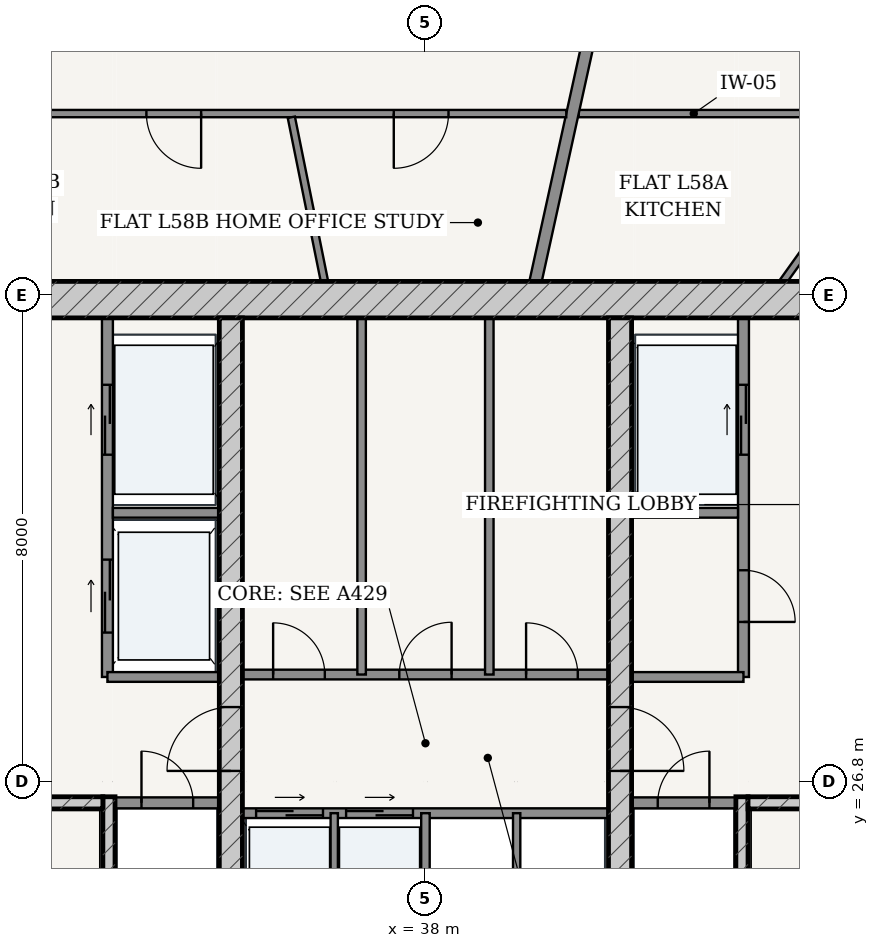
"""IFC4 building model, lengths in metres.
Left out: names, types, materials, properties, quantities, classifications, styles, units other than length and angle.
Written with IfcOpenShell. Run it as: python <this file> out.ifc"""

import sys

from ifc_helpers import new_model, si_unit, direction, frame, frame_2d, origin, place, context, subcontext, project, spatial, rectangle, extrude, source, transform, mapped, element, fill, save


model = new_model("IFC4")
c1 = context("Model", 3, precision=1e-05, world=origin(), true_north=direction((-0.2419218956, 0.970295726276)))
c2 = subcontext(c1, "Body", "Model", "MODEL_VIEW")
j1 = project(units=[si_unit("LENGTHUNIT", "METRE"), si_unit("PLANEANGLEUNIT", "RADIAN")], contexts=[c1])
p1 = place(None, origin())
s1 = spatial("IfcSite", under=j1, at=p1, CompositionType="ELEMENT")
p2 = place(p1, origin())
s2 = spatial("IfcBuilding", under=s1, at=p2, CompositionType="ELEMENT")
p3 = place(p2, frame((0.0, 0.0, 220.8)))
s3 = spatial("IfcBuildingStorey", under=s2, at=p3, CompositionType="ELEMENT", Elevation=220.8)
p4 = place(p3, frame((28.775, 34.725, 0.0), z_axis=(0.0, 0.0, 1.0), x_axis=(1.0, 0.0, 0.0)))
e1 = element("IfcWall", 1, at=p4, inside=s3, PredefinedType="SHEAR", context=c2, shape_type="SweptSolid", body=[
    extrude(rectangle(XDim=18.45, YDim=0.6, at=frame_2d((9.225, 0.0))), origin(), (0.0, 0.0, 1.0), 3.435),
])
p5 = place(p3, frame((32.795, 19.175, 0.0), z_axis=(0.0, 0.0, 1.0), x_axis=(0.0, 1.0, 0.0)))
e2 = element("IfcWall", 2, at=p5, inside=s3, PredefinedType="SOLIDWALL", context=c2, shape_type="SweptSolid", body=[
    extrude(rectangle(XDim=7.375, YDim=0.2, at=frame_2d((3.688, 0.0))), origin(), (0.0, 0.0, 1.0), 3.435),
])
p6 = place(p3, frame((29.375, 26.45, 0.0), z_axis=(0.0, 0.0, 1.0), x_axis=(1.0, 0.0, 0.0)))
e3 = element("IfcWall", 3, at=p6, inside=s3, PredefinedType="SOLIDWALL", context=c2, shape_type="SweptSolid", body=[
    extrude(rectangle(XDim=3.32, YDim=0.2, at=frame_2d((1.66, 0.0))), origin(), (0.0, 0.0, 1.0), 3.435),
])
p7 = place(p6, frame((1.185, 0.0, 0.0)))
e4 = element("IfcOpeningElement", 4, at=p7, cuts=e3, PredefinedType="OPENING", context=c2, shape_type="SweptSolid", body=[
    extrude(rectangle(XDim=0.95, YDim=2.15, at=frame_2d((0.475, 1.075))), frame((0.0, 0.11, 0.0), z_axis=(0.0, -1.0, 0.0), x_axis=(1.0, 0.0, 0.0)), (0.0, 0.0, 1.0), 0.22),
])
p8 = place(p3, frame((43.205, 19.175, 0.0), z_axis=(0.0, 0.0, 1.0), x_axis=(0.0, 1.0, 0.0)))
e5 = element("IfcWall", 5, at=p8, inside=s3, PredefinedType="SOLIDWALL", context=c2, shape_type="SweptSolid", body=[
    extrude(rectangle(XDim=7.375, YDim=0.2, at=frame_2d((3.688, 0.0))), origin(), (0.0, 0.0, 1.0), 3.435),
])
p9 = place(p3, frame((43.305, 26.45, 0.0), z_axis=(0.0, 0.0, 1.0), x_axis=(1.0, 0.0, 0.0)))
e6 = element("IfcWall", 6, at=p9, inside=s3, PredefinedType="SOLIDWALL", context=c2, shape_type="SweptSolid", body=[
    extrude(rectangle(XDim=3.32, YDim=0.2, at=frame_2d((1.66, 0.0))), origin(), (0.0, 0.0, 1.0), 3.435),
])
p10 = place(p9, frame((1.185, 0.0, 0.0)))
e7 = element("IfcOpeningElement", 7, at=p10, cuts=e6, PredefinedType="OPENING", context=c2, shape_type="SweptSolid", body=[
    extrude(rectangle(XDim=0.95, YDim=2.15, at=frame_2d((0.475, 1.075))), frame((0.0, 0.11, 0.0), z_axis=(0.0, -1.0, 0.0), x_axis=(1.0, 0.0, 0.0)), (0.0, 0.0, 1.0), 0.22),
])
p11 = place(p3, frame((34.8, 19.175, 0.0), z_axis=(0.0, 0.0, 1.0), x_axis=(0.0, 1.0, 0.0)))
e8 = element("IfcWall", 8, at=p11, inside=s3, PredefinedType="SHEAR", context=c2, shape_type="SweptSolid", body=[
    extrude(rectangle(XDim=15.25, YDim=0.38, at=frame_2d((7.625, 0.0))), origin(), (0.0, 0.0, 1.0), 3.435),
])
p12 = place(p11, frame((7.8, 0.0, 0.0)))
e9 = element("IfcOpeningElement", 9, at=p12, cuts=e8, PredefinedType="OPENING", context=c2, shape_type="SweptSolid", body=[
    extrude(rectangle(XDim=1.05, YDim=2.15, at=frame_2d((0.525, 1.075))), frame((0.0, 0.2, 0.0), z_axis=(0.0, -1.0, 0.0), x_axis=(1.0, 0.0, 0.0)), (0.0, 0.0, 1.0), 0.4),
])
p13 = place(p3, frame((41.2, 19.175, 0.0), z_axis=(0.0, 0.0, 1.0), x_axis=(0.0, 1.0, 0.0)))
e10 = element("IfcWall", 10, at=p13, inside=s3, PredefinedType="SHEAR", context=c2, shape_type="SweptSolid", body=[
    extrude(rectangle(XDim=15.25, YDim=0.38, at=frame_2d((7.625, 0.0))), origin(), (0.0, 0.0, 1.0), 3.435),
])
p14 = place(p13, frame((7.8, 0.0, 0.0)))
e11 = element("IfcOpeningElement", 11, at=p14, cuts=e10, PredefinedType="OPENING", context=c2, shape_type="SweptSolid", body=[
    extrude(rectangle(XDim=1.05, YDim=2.15, at=frame_2d((0.525, 1.075))), frame((0.0, 0.2, 0.0), z_axis=(0.0, -1.0, 0.0), x_axis=(1.0, 0.0, 0.0)), (0.0, 0.0, 1.0), 0.4),
])
p15 = place(p3, frame((32.9, 26.45, 0.0), z_axis=(0.0, 0.0, 1.0), x_axis=(1.0, 0.0, 0.0)))
e12 = element("IfcWall", 12, at=p15, inside=s3, PredefinedType="PARTITIONING", context=c2, shape_type="SweptSolid", body=[
    extrude(rectangle(XDim=1.71, YDim=0.18, at=frame_2d((0.855, 0.0))), origin(), (0.0, 0.0, 1.0), 3.435),
])
p16 = place(p15, frame((0.43, 0.0, 0.0)))
e13 = element("IfcOpeningElement", 13, at=p16, cuts=e12, PredefinedType="OPENING", context=c2, shape_type="SweptSolid", body=[
    extrude(rectangle(XDim=0.85, YDim=2.1, at=frame_2d((0.425, 1.05))), frame((0.0, 0.1, 0.0), z_axis=(0.0, -1.0, 0.0), x_axis=(1.0, 0.0, 0.0)), (0.0, 0.0, 1.0), 0.2),
])
p17 = place(p3, frame((41.39, 26.45, 0.0), z_axis=(0.0, 0.0, 1.0), x_axis=(1.0, 0.0, 0.0)))
e14 = element("IfcWall", 14, at=p17, inside=s3, PredefinedType="PARTITIONING", context=c2, shape_type="SweptSolid", body=[
    extrude(rectangle(XDim=1.71, YDim=0.18, at=frame_2d((0.855, 0.0))), origin(), (0.0, 0.0, 1.0), 3.435),
])
p18 = place(p17, frame((0.43, 0.0, 0.0)))
e15 = element("IfcOpeningElement", 15, at=p18, cuts=e14, PredefinedType="OPENING", context=c2, shape_type="SweptSolid", body=[
    extrude(rectangle(XDim=0.85, YDim=2.1, at=frame_2d((0.425, 1.05))), frame((0.0, 0.1, 0.0), z_axis=(0.0, -1.0, 0.0), x_axis=(1.0, 0.0, 0.0)), (0.0, 0.0, 1.0), 0.2),
])
p19 = place(p3, frame((32.77, 28.52, 0.0), z_axis=(0.0, 0.0, 1.0), x_axis=(0.0, 1.0, 0.0)))
e16 = element("IfcWall", 16, at=p19, inside=s3, PredefinedType="PARTITIONING", context=c2, shape_type="SweptSolid", body=[
    extrude(rectangle(XDim=5.905, YDim=0.18, at=frame_2d((2.953, 0.0))), origin(), (0.0, 0.0, 1.0), 3.435),
])
p20 = place(p19, frame((3.655, 0.0, 0.0)))
e17 = element("IfcOpeningElement", 17, at=p20, cuts=e16, PredefinedType="OPENING", context=c2, shape_type="SweptSolid", body=[
    extrude(rectangle(XDim=1.15, YDim=2.2, at=frame_2d((0.575, 1.1))), frame((0.0, 0.1, 0.0), z_axis=(0.0, -1.0, 0.0), x_axis=(1.0, 0.0, 0.0)), (0.0, 0.0, 1.0), 0.2),
])
p21 = place(p19, frame((0.73, 0.0, 0.0)))
e18 = element("IfcOpeningElement", 18, at=p21, cuts=e16, PredefinedType="OPENING", context=c2, shape_type="SweptSolid", body=[
    extrude(rectangle(XDim=1.2, YDim=2.25, at=frame_2d((0.6, 1.125))), frame((0.0, 0.1, 0.0), z_axis=(0.0, -1.0, 0.0), x_axis=(1.0, 0.0, 0.0)), (0.0, 0.0, 1.0), 0.2),
])
p22 = place(p3, frame((32.86, 31.22, 0.0), z_axis=(0.0, 0.0, 1.0), x_axis=(1.0, 0.0, 0.0)))
e19 = element("IfcWall", 19, at=p22, inside=s3, PredefinedType="PARTITIONING", context=c2, shape_type="SweptSolid", body=[
    extrude(rectangle(XDim=1.75, YDim=0.16, at=frame_2d((0.875, 0.0))), origin(), (0.0, 0.0, 1.0), 3.435),
])
p23 = place(p3, frame((32.77, 28.52, 0.0), z_axis=(0.0, 0.0, 1.0), x_axis=(1.0, 0.0, 0.0)))
e20 = element("IfcWall", 20, at=p23, inside=s3, PredefinedType="PARTITIONING", context=c2, shape_type="SweptSolid", body=[
    extrude(rectangle(XDim=1.84, YDim=0.16, at=frame_2d((0.92, 0.0))), origin(), (0.0, 0.0, 1.0), 3.435),
])
p24 = place(p3, frame((43.23, 28.52, 0.0), z_axis=(0.0, 0.0, 1.0), x_axis=(0.0, 1.0, 0.0)))
e21 = element("IfcWall", 21, at=p24, inside=s3, PredefinedType="PARTITIONING", context=c2, shape_type="SweptSolid", body=[
    extrude(rectangle(XDim=5.905, YDim=0.18, at=frame_2d((2.953, 0.0))), origin(), (0.0, 0.0, 1.0), 3.435),
])
p25 = place(p24, frame((0.905, 0.0, 0.0)))
e22 = element("IfcOpeningElement", 22, at=p25, cuts=e21, PredefinedType="OPENING", context=c2, shape_type="SweptSolid", body=[
    extrude(rectangle(XDim=0.85, YDim=2.1, at=frame_2d((0.425, 1.05))), frame((0.0, 0.1, 0.0), z_axis=(0.0, -1.0, 0.0), x_axis=(1.0, 0.0, 0.0)), (0.0, 0.0, 1.0), 0.2),
])
p26 = place(p24, frame((3.655, 0.0, 0.0)))
e23 = element("IfcOpeningElement", 23, at=p26, cuts=e21, PredefinedType="OPENING", context=c2, shape_type="SweptSolid", body=[
    extrude(rectangle(XDim=1.15, YDim=2.2, at=frame_2d((0.575, 1.1))), frame((0.0, 0.1, 0.0), z_axis=(0.0, -1.0, 0.0), x_axis=(1.0, 0.0, 0.0)), (0.0, 0.0, 1.0), 0.2),
])
p27 = place(p3, frame((41.39, 31.22, 0.0), z_axis=(0.0, 0.0, 1.0), x_axis=(1.0, 0.0, 0.0)))
e24 = element("IfcWall", 24, at=p27, inside=s3, PredefinedType="PARTITIONING", context=c2, shape_type="SweptSolid", body=[
    extrude(rectangle(XDim=1.75, YDim=0.16, at=frame_2d((0.875, 0.0))), origin(), (0.0, 0.0, 1.0), 3.435),
])
p28 = place(p3, frame((41.39, 28.52, 0.0), z_axis=(0.0, 0.0, 1.0), x_axis=(1.0, 0.0, 0.0)))
e25 = element("IfcWall", 25, at=p28, inside=s3, PredefinedType="PARTITIONING", context=c2, shape_type="SweptSolid", body=[
    extrude(rectangle(XDim=1.84, YDim=0.16, at=frame_2d((0.92, 0.0))), origin(), (0.0, 0.0, 1.0), 3.435),
])
p29 = place(p3, frame((34.99, 28.56, 0.0), z_axis=(0.0, 0.0, 1.0), x_axis=(1.0, 0.0, 0.0)))
e26 = element("IfcWall", 26, at=p29, inside=s3, PredefinedType="PARTITIONING", context=c2, shape_type="SweptSolid", body=[
    extrude(rectangle(XDim=6.02, YDim=0.16, at=frame_2d((3.01, 0.0))), origin(), (0.0, 0.0, 1.0), 3.435),
])
p30 = place(p29, frame((0.505, 0.0, 0.0)))
e27 = element("IfcOpeningElement", 27, at=p30, cuts=e26, PredefinedType="OPENING", context=c2, shape_type="SweptSolid", body=[
    extrude(rectangle(XDim=0.85, YDim=2.1, at=frame_2d((0.425, 1.05))), frame((0.0, 0.09, 0.0), z_axis=(0.0, -1.0, 0.0), x_axis=(1.0, 0.0, 0.0)), (0.0, 0.0, 1.0), 0.18),
])
p31 = place(p29, frame((2.58, 0.0, 0.0)))
e28 = element("IfcOpeningElement", 28, at=p31, cuts=e26, PredefinedType="OPENING", context=c2, shape_type="SweptSolid", body=[
    extrude(rectangle(XDim=0.86, YDim=2.1, at=frame_2d((0.43, 1.05))), frame((0.0, 0.09, 0.0), z_axis=(0.0, -1.0, 0.0), x_axis=(1.0, 0.0, 0.0)), (0.0, 0.0, 1.0), 0.18),
])
p32 = place(p29, frame((4.665, 0.0, 0.0)))
e29 = element("IfcOpeningElement", 29, at=p32, cuts=e26, PredefinedType="OPENING", context=c2, shape_type="SweptSolid", body=[
    extrude(rectangle(XDim=0.85, YDim=2.1, at=frame_2d((0.425, 1.05))), frame((0.0, 0.09, 0.0), z_axis=(0.0, -1.0, 0.0), x_axis=(1.0, 0.0, 0.0)), (0.0, 0.0, 1.0), 0.18),
])
for number, where, z_axis, x_axis in (
    (30, (36.95, 28.56, 0.0), (0.0, 0.0, 1.0), (0.0, 1.0, 0.0)),
    (31, (39.05, 28.56, 0.0), (0.0, 0.0, 1.0), (0.0, 1.0, 0.0)),
):
    element("IfcWall", number, at=place(p3, frame(where, z_axis=z_axis, x_axis=x_axis)), inside=s3, PredefinedType="PARTITIONING", context=c2, shape_type="SweptSolid", body=[
        extrude(rectangle(XDim=5.865, YDim=0.14, at=frame_2d((2.933, 0.0))), origin(), (0.0, 0.0, 1.0), 3.435),
    ])
p33 = place(p3, frame((34.99, 26.28, 0.0), z_axis=(0.0, 0.0, 1.0), x_axis=(1.0, 0.0, 0.0)))
e32 = element("IfcWall", 32, at=p33, inside=s3, PredefinedType="PARTITIONING", context=c2, shape_type="SweptSolid", body=[
    extrude(rectangle(XDim=6.02, YDim=0.16, at=frame_2d((3.01, 0.0))), origin(), (0.0, 0.0, 1.0), 3.435),
])
p34 = place(p33, frame((0.225, 0.0, 0.0)))
e33 = element("IfcOpeningElement", 33, at=p34, cuts=e32, PredefinedType="OPENING", context=c2, shape_type="SweptSolid", body=[
    extrude(rectangle(XDim=1.1, YDim=2.2, at=frame_2d((0.55, 1.1))), frame((0.0, 0.09, 0.0), z_axis=(0.0, -1.0, 0.0), x_axis=(1.0, 0.0, 0.0)), (0.0, 0.0, 1.0), 0.18),
])
p35 = place(p33, frame((1.705, 0.0, 0.0)))
e34 = element("IfcOpeningElement", 34, at=p35, cuts=e32, PredefinedType="OPENING", context=c2, shape_type="SweptSolid", body=[
    extrude(rectangle(XDim=1.1, YDim=2.2, at=frame_2d((0.55, 1.1))), frame((0.0, 0.09, 0.0), z_axis=(0.0, -1.0, 0.0), x_axis=(1.0, 0.0, 0.0)), (0.0, 0.0, 1.0), 0.18),
])
p36 = place(p3, frame((36.5, 23.72, 0.0), z_axis=(0.0, 0.0, 1.0), x_axis=(0.0, 1.0, 0.0)))
e35 = element("IfcWall", 35, at=p36, inside=s3, PredefinedType="PARTITIONING", context=c2, shape_type="SweptSolid", body=[
    extrude(rectangle(XDim=2.56, YDim=0.12, at=frame_2d((1.28, 0.0))), origin(), (0.0, 0.0, 1.0), 3.435),
])
p37 = place(p3, frame((38.0, 23.72, 0.0), z_axis=(0.0, 0.0, 1.0), x_axis=(0.0, 1.0, 0.0)))
e36 = element("IfcWall", 36, at=p37, inside=s3, PredefinedType="PARTITIONING", context=c2, shape_type="SweptSolid", body=[
    extrude(rectangle(XDim=2.56, YDim=0.14, at=frame_2d((1.28, 0.0))), origin(), (0.0, 0.0, 1.0), 3.435),
])
p38 = place(p3, frame((39.5, 23.72, 0.0), z_axis=(0.0, 0.0, 1.0), x_axis=(0.0, 1.0, 0.0)))
e37 = element("IfcWall", 37, at=p38, inside=s3, PredefinedType="PARTITIONING", context=c2, shape_type="SweptSolid", body=[
    extrude(rectangle(XDim=2.56, YDim=0.12, at=frame_2d((1.28, 0.0))), origin(), (0.0, 0.0, 1.0), 3.435),
])
p39 = place(p3, frame((40.52, 37.785, 0.0), z_axis=(0.0, 0.0, 1.0), x_axis=(1.0, 0.0, 0.0)))
e38 = element("IfcWall", 38, at=p39, inside=s3, PredefinedType="PARTITIONING", context=c2, shape_type="SweptSolid", body=[
    extrude(rectangle(XDim=3.785, YDim=0.12, at=frame_2d((1.893, 0.0))), origin(), (0.0, 0.0, 1.0), 2.951),
])
p40 = place(p3, frame((43.885, 35.027, 0.0), z_axis=(0.0, 0.0, 1.0), x_axis=(0.581801309538, 0.813330951225, 0.0)))
e39 = element("IfcWall", 39, at=p40, inside=s3, PredefinedType="PARTITIONING", context=c2, shape_type="SweptSolid", body=[
    extrude(rectangle(XDim=3.526, YDim=0.12, at=frame_2d((1.763, 0.0))), origin(), (0.0, 0.0, 1.0), 3.435),
])
p41 = place(p40, frame((1.313, 0.0, 0.0)))
e40 = element("IfcOpeningElement", 40, at=p41, cuts=e39, PredefinedType="OPENING", context=c2, shape_type="SweptSolid", body=[
    extrude(rectangle(XDim=0.9, YDim=2.15, at=frame_2d((0.45, 1.075))), frame((0.0, 0.07, 0.0), z_axis=(0.0, -1.0, 0.0), x_axis=(1.0, 0.0, 0.0)), (0.0, 0.0, 1.0), 0.14),
])
p42 = place(p3, frame((39.811, 35.027, 0.0), z_axis=(0.0, 0.0, 1.0), x_axis=(0.214966857327, 0.976621344356, 0.0)))
e41 = element("IfcWall", 41, at=p42, inside=s3, PredefinedType="PARTITIONING", context=c2, shape_type="SweptSolid", body=[
    extrude(rectangle(XDim=11.258, YDim=0.2, at=frame_2d((5.629, 0.0))), origin(), (0.0, 0.0, 1.0), 2.52),
])
p43 = place(p3, frame((31.695, 37.785, 0.0), z_axis=(0.0, 0.0, 1.0), x_axis=(1.0, 0.0, 0.0)))
e42 = element("IfcWall", 42, at=p43, inside=s3, PredefinedType="PARTITIONING", context=c2, shape_type="SweptSolid", body=[
    extrude(rectangle(XDim=8.621, YDim=0.12, at=frame_2d((4.311, 0.0))), origin(), (0.0, 0.0, 1.0), 2.951),
])
p44 = place(p43, frame((1.716, 0.0, 0.0)))
e43 = element("IfcOpeningElement", 43, at=p44, cuts=e42, PredefinedType="OPENING", context=c2, shape_type="SweptSolid", body=[
    extrude(rectangle(XDim=0.9, YDim=2.15, at=frame_2d((0.45, 1.075))), frame((0.0, 0.07, 0.0), z_axis=(0.0, -1.0, 0.0), x_axis=(1.0, 0.0, 0.0)), (0.0, 0.0, 1.0), 0.14),
])
p45 = place(p43, frame((5.784, 0.0, 0.0)))
e44 = element("IfcOpeningElement", 44, at=p45, cuts=e42, PredefinedType="OPENING", context=c2, shape_type="SweptSolid", body=[
    extrude(rectangle(XDim=0.9, YDim=2.15, at=frame_2d((0.45, 1.075))), frame((0.0, 0.07, 0.0), z_axis=(0.0, -1.0, 0.0), x_axis=(1.0, 0.0, 0.0)), (0.0, 0.0, 1.0), 0.14),
])
p46 = place(p3, frame((36.339, 35.027, 0.0), z_axis=(0.0, 0.0, 1.0), x_axis=(-0.197856196381, 0.980231057228, 0.0)))
e45 = element("IfcWall", 45, at=p46, inside=s3, PredefinedType="PARTITIONING", context=c2, shape_type="SweptSolid", body=[
    extrude(rectangle(XDim=2.752, YDim=0.12, at=frame_2d((1.376, 0.0))), origin(), (0.0, 0.0, 1.0), 2.52),
])
m1 = source(origin(), c2, "Body", "SweptSolid", [
    extrude(rectangle(XDim=1.05, YDim=2.15, at=frame_2d((0.525, 1.075))), frame((0.0, 0.025, 0.0), z_axis=(0.0, -1.0, 0.0), x_axis=(1.0, 0.0, 0.0)), (0.0, 0.0, 1.0), 0.05),
])
p47 = place(p12, origin())
e46 = element("IfcDoor", 46, at=p47, inside=s3, OperationType="SINGLE_SWING_LEFT", PredefinedType="DOOR", context=c2, shape_type="MappedRepresentation", body=[
    mapped(m1, transform((0.0, 0.0, 0.0), scale=1.0)),
])
fill(e9, e46)
p48 = place(p14, frame((1.05, 0.0, 0.0), z_axis=(0.0, 0.0, 1.0), x_axis=(-1.0, 0.0, 0.0)))
e47 = element("IfcDoor", 47, at=p48, inside=s3, OperationType="SINGLE_SWING_RIGHT", PredefinedType="DOOR", context=c2, shape_type="MappedRepresentation", body=[
    mapped(m1, transform((0.0, 0.0, 0.0), scale=1.0)),
])
fill(e11, e47)
m2 = source(origin(), c2, "Body", "SweptSolid", [
    extrude(rectangle(XDim=0.85, YDim=2.1, at=frame_2d((0.425, 1.05))), frame((0.0, 0.025, 0.0), z_axis=(0.0, -1.0, 0.0), x_axis=(1.0, 0.0, 0.0)), (0.0, 0.0, 1.0), 0.05),
])
p49 = place(p16, origin())
e48 = element("IfcDoor", 48, at=p49, inside=s3, OperationType="SINGLE_SWING_LEFT", PredefinedType="DOOR", context=c2, shape_type="MappedRepresentation", body=[
    mapped(m2, transform((0.0, 0.0, 0.0), scale=1.0)),
])
fill(e13, e48)
p50 = place(p18, origin())
e49 = element("IfcDoor", 49, at=p50, inside=s3, OperationType="SINGLE_SWING_RIGHT", PredefinedType="DOOR", context=c2, shape_type="MappedRepresentation", body=[
    mapped(m2, transform((0.0, 0.0, 0.0), scale=1.0)),
])
fill(e15, e49)
p51 = place(p25, frame((0.85, 0.0, 0.0), z_axis=(0.0, 0.0, 1.0), x_axis=(-1.0, 0.0, 0.0)))
e50 = element("IfcDoor", 50, at=p51, inside=s3, OperationType="SINGLE_SWING_RIGHT", PredefinedType="DOOR", context=c2, shape_type="MappedRepresentation", body=[
    mapped(m2, transform((0.0, 0.0, 0.0), scale=1.0)),
])
fill(e22, e50)
p52 = place(p30, origin())
e51 = element("IfcDoor", 51, at=p52, inside=s3, OperationType="SINGLE_SWING_LEFT", PredefinedType="DOOR", context=c2, shape_type="MappedRepresentation", body=[
    mapped(m2, transform((0.0, 0.0, 0.0), scale=1.0)),
])
fill(e27, e51)
m3 = source(origin(), c2, "Body", "SweptSolid", [
    extrude(rectangle(XDim=0.86, YDim=2.1, at=frame_2d((0.43, 1.05))), frame((0.0, 0.025, 0.0), z_axis=(0.0, -1.0, 0.0), x_axis=(1.0, 0.0, 0.0)), (0.0, 0.0, 1.0), 0.05),
])
p53 = place(p31, origin())
e52 = element("IfcDoor", 52, at=p53, inside=s3, OperationType="SINGLE_SWING_RIGHT", PredefinedType="DOOR", context=c2, shape_type="MappedRepresentation", body=[
    mapped(m3, transform((0.0, 0.0, 0.0), scale=1.0)),
])
fill(e28, e52)
p54 = place(p32, origin())
e53 = element("IfcDoor", 53, at=p54, inside=s3, OperationType="SINGLE_SWING_LEFT", PredefinedType="DOOR", context=c2, shape_type="MappedRepresentation", body=[
    mapped(m2, transform((0.0, 0.0, 0.0), scale=1.0)),
])
fill(e29, e53)
m4 = source(origin(), c2, "Body", "SweptSolid", [
    extrude(rectangle(XDim=1.15, YDim=2.2, at=frame_2d((0.575, 1.1))), frame((0.0, 0.025, 0.0), z_axis=(0.0, -1.0, 0.0), x_axis=(1.0, 0.0, 0.0)), (0.0, 0.0, 1.0), 0.05),
])
p55 = place(p20, origin())
e54 = element("IfcDoor", 54, at=p55, inside=s3, OperationType="DOUBLE_DOOR_SLIDING", PredefinedType="DOOR", context=c2, shape_type="MappedRepresentation", body=[
    mapped(m4, transform((0.0, 0.0, 0.0), scale=1.0)),
])
fill(e17, e54)
p56 = place(p26, origin())
e55 = element("IfcDoor", 55, at=p56, inside=s3, OperationType="DOUBLE_DOOR_SLIDING", PredefinedType="DOOR", context=c2, shape_type="MappedRepresentation", body=[
    mapped(m4, transform((0.0, 0.0, 0.0), scale=1.0)),
])
fill(e23, e55)
m5 = source(origin(), c2, "Body", "SweptSolid", [
    extrude(rectangle(XDim=1.2, YDim=2.25, at=frame_2d((0.6, 1.125))), frame((0.0, 0.025, 0.0), z_axis=(0.0, -1.0, 0.0), x_axis=(1.0, 0.0, 0.0)), (0.0, 0.0, 1.0), 0.05),
])
p57 = place(p21, origin())
e56 = element("IfcDoor", 56, at=p57, inside=s3, OperationType="DOUBLE_DOOR_SLIDING", PredefinedType="DOOR", context=c2, shape_type="MappedRepresentation", body=[
    mapped(m5, transform((0.0, 0.0, 0.0), scale=1.0)),
])
fill(e18, e56)
m6 = source(origin(), c2, "Body", "SweptSolid", [
    extrude(rectangle(XDim=1.1, YDim=2.2, at=frame_2d((0.55, 1.1))), frame((0.0, 0.025, 0.0), z_axis=(0.0, -1.0, 0.0), x_axis=(1.0, 0.0, 0.0)), (0.0, 0.0, 1.0), 0.05),
])
p58 = place(p34, origin())
e57 = element("IfcDoor", 57, at=p58, inside=s3, OperationType="DOUBLE_DOOR_SLIDING", PredefinedType="DOOR", context=c2, shape_type="MappedRepresentation", body=[
    mapped(m6, transform((0.0, 0.0, 0.0), scale=1.0)),
])
fill(e33, e57)
p59 = place(p35, origin())
e58 = element("IfcDoor", 58, at=p59, inside=s3, OperationType="DOUBLE_DOOR_SLIDING", PredefinedType="DOOR", context=c2, shape_type="MappedRepresentation", body=[
    mapped(m6, transform((0.0, 0.0, 0.0), scale=1.0)),
])
fill(e34, e58)
m7 = source(origin(), c2, "Body", "SweptSolid", [
    extrude(rectangle(XDim=0.9, YDim=2.15, at=frame_2d((0.45, 1.075))), frame((0.0, 0.025, 0.0), z_axis=(0.0, -1.0, 0.0), x_axis=(1.0, 0.0, 0.0)), (0.0, 0.0, 1.0), 0.05),
])
p60 = place(p44, frame((0.9, 0.0, 0.0), z_axis=(0.0, 0.0, 1.0), x_axis=(-1.0, 0.0, 0.0)))
e59 = element("IfcDoor", 59, at=p60, inside=s3, OperationType="SINGLE_SWING_LEFT", PredefinedType="DOOR", context=c2, shape_type="MappedRepresentation", body=[
    mapped(m7, transform((0.0, 0.0, 0.0), scale=1.0)),
])
fill(e43, e59)
p61 = place(p45, frame((0.9, 0.0, 0.0), z_axis=(0.0, 0.0, 1.0), x_axis=(-1.0, 0.0, 0.0)))
e60 = element("IfcDoor", 60, at=p61, inside=s3, OperationType="SINGLE_SWING_RIGHT", PredefinedType="DOOR", context=c2, shape_type="MappedRepresentation", body=[
    mapped(m7, transform((0.0, 0.0, 0.0), scale=1.0)),
])
fill(e44, e60)
save(model, sys.argv[1])
